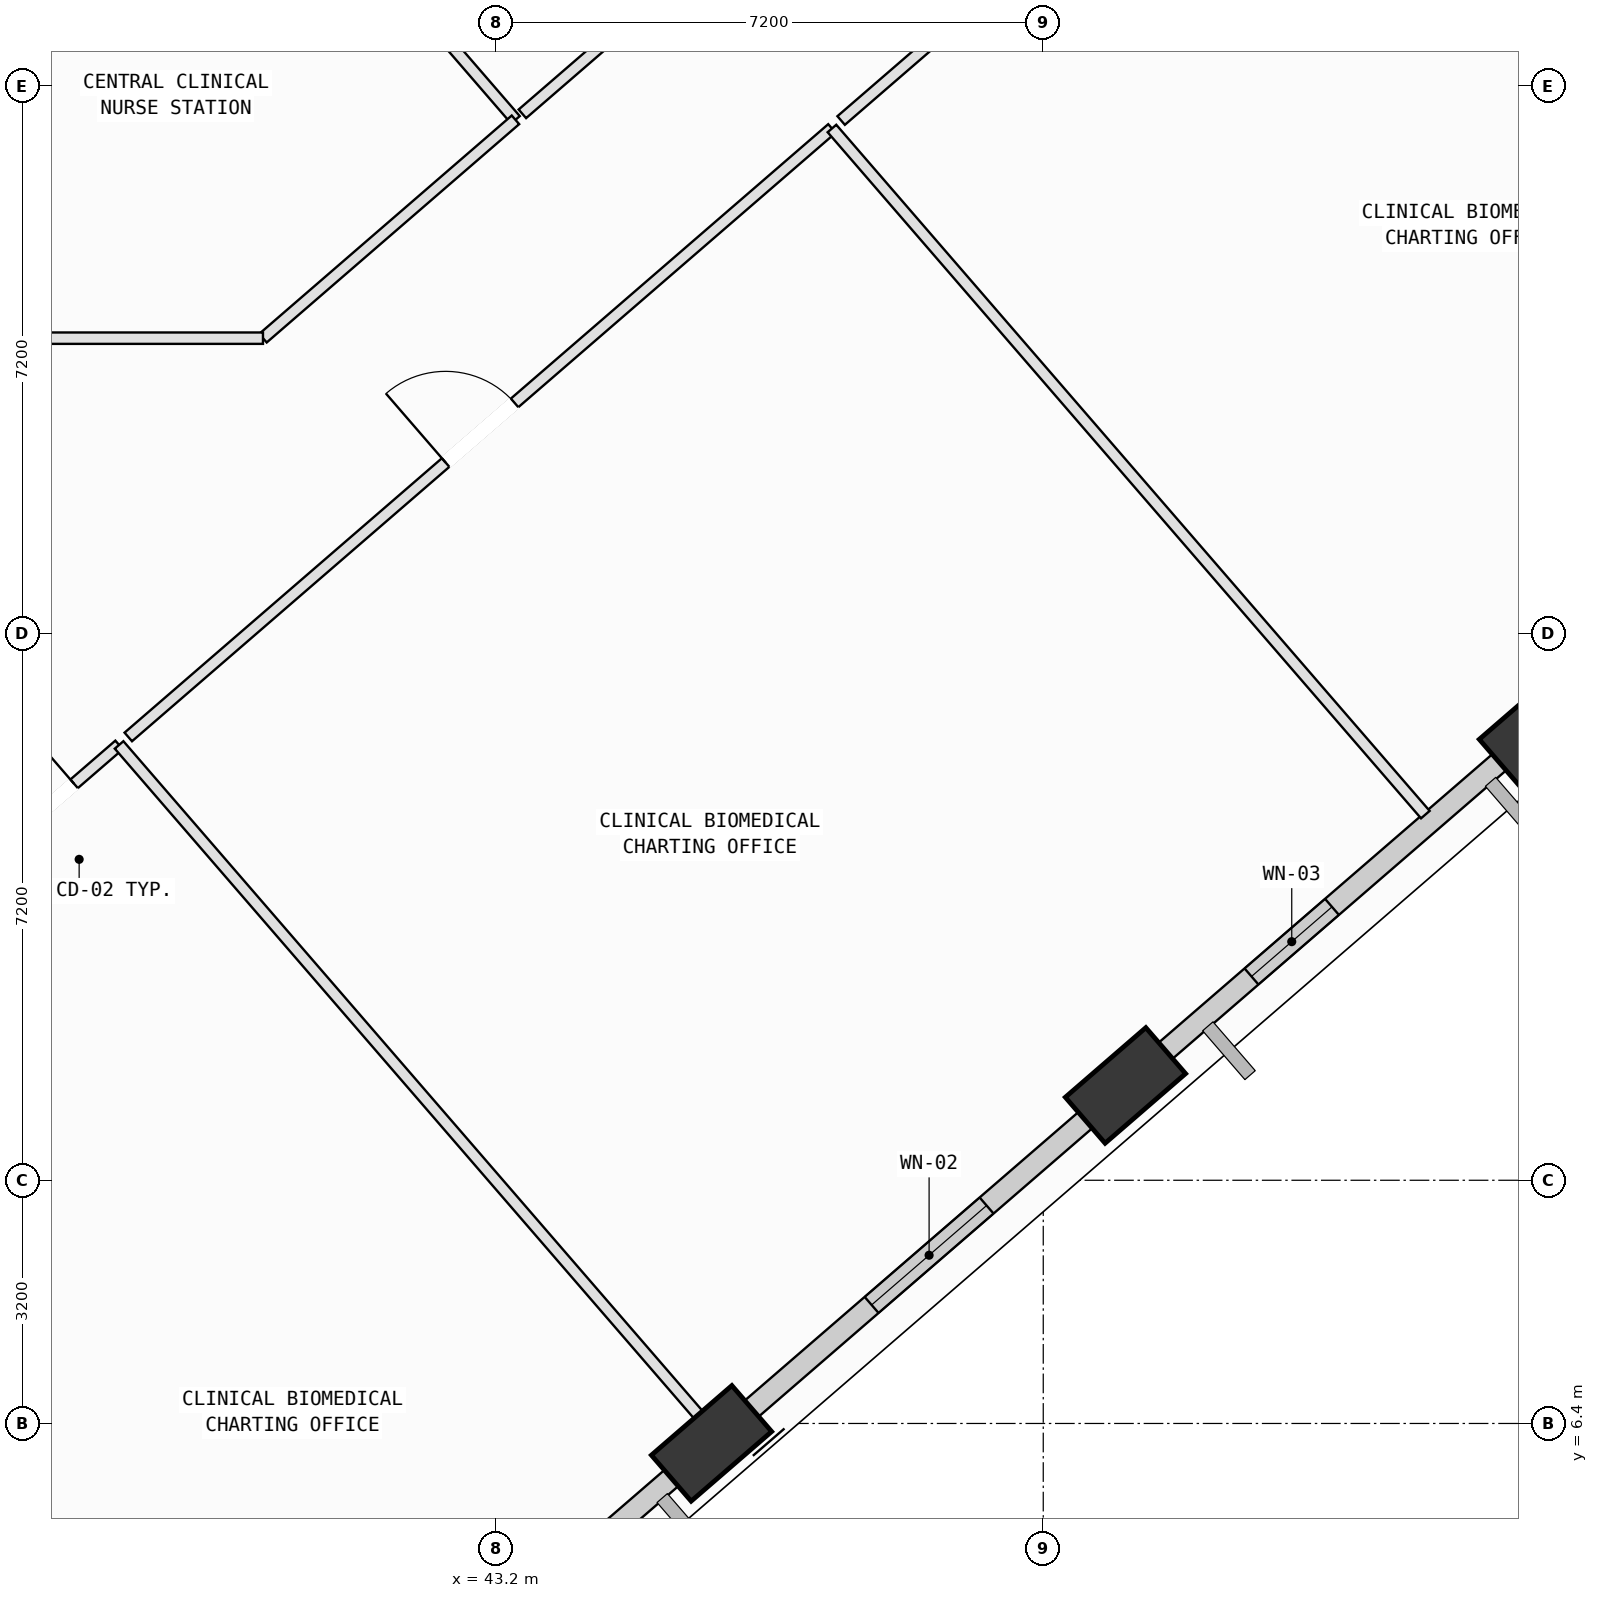
"""IFC4 building model, lengths in metres.
Left out: names, types, materials, properties, quantities, classifications, styles, units other than length and angle.
Written with IfcOpenShell. Run it as: python <this file> out.ifc"""

import sys

from ifc_helpers import new_model, si_unit, direction, frame, frame_2d, origin, origin_2d, place, context, subcontext, project, spatial, rectangle, extrude, element, fill, save


model = new_model("IFC4")
c1 = context("Model", 3, precision=1e-05, world=origin(), true_north=direction((0.0, 1.0)))
c2 = subcontext(c1, "Body", "Model", "MODEL_VIEW")
j1 = project(units=[si_unit("LENGTHUNIT", "METRE"), si_unit("PLANEANGLEUNIT", "RADIAN")], contexts=[c1])
p1 = place(None, origin())
s1 = spatial("IfcSite", under=j1, at=p1, CompositionType="ELEMENT")
p2 = place(p1, origin())
s2 = spatial("IfcBuilding", under=s1, at=p2, CompositionType="ELEMENT")
p3 = place(p2, frame((0.0, 0.0, 197.8)))
s3 = spatial("IfcBuildingStorey", under=s2, at=p3, CompositionType="ELEMENT", Elevation=197.8)
p4 = place(p3, frame((46.035, 6.138, 0.002), z_axis=(0.076583639666, 0.051947917613, 0.995708973542), x_axis=(-0.963601634945, 0.260400031482, 0.060528610881)))
e1 = element("IfcColumn", 1, at=p4, inside=s3, PredefinedType="COLUMN", context=c2, shape_type="SweptSolid", body=[
    extrude(rectangle(XDim=1.4, YDim=0.8, at=origin_2d()), origin(), (0.0, 0.0, 1.0), 4.014),
])
p5 = place(p3, frame((51.482, 10.848, 0.002), z_axis=(0.056990983007, 0.074264664089, 0.995608752233), x_axis=(-0.996545411149, -0.056108371123, 0.061229847357)))
e2 = element("IfcColumn", 2, at=p5, inside=s3, PredefinedType="COLUMN", context=c2, shape_type="SweptSolid", body=[
    extrude(rectangle(XDim=1.4, YDim=0.8, at=origin_2d()), origin(), (0.0, 0.0, 1.0), 4.014),
])
p6 = place(p3, frame((56.928, 15.557, 0.002), z_axis=(0.037308659292, 0.096492102534, 0.994634273535), x_axis=(-0.940140058416, -0.334002750608, 0.067667075804)))
e3 = element("IfcColumn", 3, at=p6, inside=s3, PredefinedType="COLUMN", context=c2, shape_type="SweptSolid", body=[
    extrude(rectangle(XDim=1.4, YDim=0.8, at=origin_2d()), origin(), (0.0, 0.0, 1.0), 4.018),
])
p7 = place(p3, frame((45.8, 5.935, 0.0), z_axis=(0.0, 0.0, 1.0), x_axis=(-0.756443022553, -0.654059594862, 0.0)))
e4 = element("IfcWall", 4, at=p7, inside=s3, PredefinedType="SOLIDWALL", context=c2, shape_type="SweptSolid", body=[
    extrude(rectangle(XDim=6.214, YDim=0.28, at=frame_2d((3.107, 0.0))), origin(), (0.0, 0.0, 1.0), 3.265),
])
p8 = place(p7, frame((2.306, 0.0, 0.75)))
e5 = element("IfcOpeningElement", 5, at=p8, cuts=e4, PredefinedType="OPENING", context=c2, shape_type="SweptSolid", body=[
    extrude(rectangle(XDim=1.6, YDim=1.95, at=frame_2d((0.8, 0.975))), frame((0.0, 0.15, 0.0), z_axis=(0.0, -1.0, 0.0), x_axis=(1.0, 0.0, 0.0)), (0.0, 0.0, 1.0), 0.3),
])
p9 = place(p3, frame((51.247, 10.644, 0.0), z_axis=(0.0, 0.0, 1.0), x_axis=(-0.756429422083, -0.654075323955, 0.0)))
e6 = element("IfcWall", 6, at=p9, inside=s3, PredefinedType="SOLIDWALL", context=c2, shape_type="SweptSolid", body=[
    extrude(rectangle(XDim=6.209, YDim=0.28, at=frame_2d((3.104, 0.0))), origin(), (0.0, 0.0, 1.0), 3.265),
])
p10 = place(p9, frame((2.105, 0.0, 0.75)))
e7 = element("IfcOpeningElement", 7, at=p10, cuts=e6, PredefinedType="OPENING", context=c2, shape_type="SweptSolid", body=[
    extrude(rectangle(XDim=2.0, YDim=1.95, at=frame_2d((1.0, 0.975))), frame((0.0, 0.15, 0.0), z_axis=(0.0, -1.0, 0.0), x_axis=(1.0, 0.0, 0.0)), (0.0, 0.0, 1.0), 0.3),
])
p11 = place(p3, frame((56.699, 15.359, 0.0), z_axis=(0.0, 0.0, 1.0), x_axis=(-0.756411472006, -0.654096082405, 0.0)))
e8 = element("IfcWall", 8, at=p11, inside=s3, PredefinedType="SOLIDWALL", context=c2, shape_type="SweptSolid", body=[
    extrude(rectangle(XDim=6.218, YDim=0.28, at=frame_2d((3.109, 0.0))), origin(), (0.0, 0.0, 1.0), 3.265),
])
p12 = place(p11, frame((3.305, 0.0, 0.75)))
e9 = element("IfcOpeningElement", 9, at=p12, cuts=e8, PredefinedType="OPENING", context=c2, shape_type="SweptSolid", body=[
    extrude(rectangle(XDim=1.4, YDim=1.85, at=frame_2d((0.7, 0.925))), frame((0.0, 0.15, 0.0), z_axis=(0.0, -1.0, 0.0), x_axis=(1.0, 0.0, 0.0)), (0.0, 0.0, 1.0), 0.3),
])
p13 = place(p3, frame((35.169, 24.372, 0.0), z_axis=(0.0, 0.0, 1.0), x_axis=(0.756430449214, 0.65407413609, 0.0)))
e10 = element("IfcWall", 10, at=p13, inside=s3, PredefinedType="SOLIDWALL", context=c2, shape_type="SweptSolid", body=[
    extrude(rectangle(XDim=6.211, YDim=0.28, at=frame_2d((3.105, 0.0))), origin(), (0.0, 0.0, 1.0), 3.265),
])
p14 = place(p13, frame((2.161, 0.0, 0.75)))
e11 = element("IfcOpeningElement", 11, at=p14, cuts=e10, PredefinedType="OPENING", context=c2, shape_type="SweptSolid", body=[
    extrude(rectangle(XDim=1.2, YDim=1.75, at=frame_2d((0.6, 0.875))), frame((0.0, 0.15, 0.0), z_axis=(0.0, -1.0, 0.0), x_axis=(1.0, 0.0, 0.0)), (0.0, 0.0, 1.0), 0.3),
])
p15 = place(p3, frame((36.15, 13.52, 0.0), z_axis=(0.0, 0.0, 1.0), x_axis=(0.756475362734, 0.654022190431, 0.0)))
e12 = element("IfcWall", 12, at=p15, inside=s3, PredefinedType="PARTITIONING", context=c2, shape_type="SweptSolid", body=[
    extrude(rectangle(XDim=2.764, YDim=0.15, at=frame_2d((1.382, 0.0))), origin(), (0.0, 0.0, 1.0), 3.78),
])
p16 = place(p15, frame((0.782, 0.0, 0.0)))
e13 = element("IfcOpeningElement", 13, at=p16, cuts=e12, PredefinedType="OPENING", context=c2, shape_type="SweptSolid", body=[
    extrude(rectangle(XDim=1.2, YDim=2.15, at=frame_2d((0.6, 1.075))), frame((0.0, 0.085, 0.0), z_axis=(0.0, -1.0, 0.0), x_axis=(1.0, 0.0, 0.0)), (0.0, 0.0, 1.0), 0.17),
])
p17 = place(p3, frame((38.241, 15.328, 0.0), z_axis=(0.0, 0.0, 1.0), x_axis=(0.654077846069, -0.756427241235, 0.0)))
e14 = element("IfcWall", 14, at=p17, inside=s3, PredefinedType="PARTITIONING", context=c2, shape_type="SweptSolid", body=[
    extrude(rectangle(XDim=12.28, YDim=0.15, at=frame_2d((6.14, 0.0))), origin(), (0.0, 0.0, 1.0), 3.78),
])
p18 = place(p3, frame((46.273, 6.039, 0.0), z_axis=(0.0, 0.0, 1.0), x_axis=(-0.755726890706, -0.654886911355, 0.0)))
e15 = element("IfcWall", 15, at=p18, inside=s3, PredefinedType="PARTITIONING", context=c2, shape_type="SweptSolid", body=[
    extrude(rectangle(XDim=0.426, YDim=0.15, at=frame_2d((0.213, 0.0))), origin(), (0.0, 0.0, 1.0), 3.265),
])
p19 = place(p3, frame((38.362, 15.433, 0.0), z_axis=(0.0, 0.0, 1.0), x_axis=(0.756407982528, 0.654100117694, 0.0)))
e16 = element("IfcWall", 16, at=p19, inside=s3, PredefinedType="PARTITIONING", context=c2, shape_type="SweptSolid", body=[
    extrude(rectangle(XDim=12.24, YDim=0.15, at=frame_2d((6.12, 0.0))), origin(), (0.0, 0.0, 1.0), 3.78),
])
p20 = place(p19, frame((5.52, 0.0, 0.0)))
e17 = element("IfcOpeningElement", 17, at=p20, cuts=e16, PredefinedType="OPENING", context=c2, shape_type="SweptSolid", body=[
    extrude(rectangle(XDim=1.2, YDim=2.15, at=frame_2d((0.6, 1.075))), frame((0.0, 0.085, 0.0), z_axis=(0.0, -1.0, 0.0), x_axis=(1.0, 0.0, 0.0)), (0.0, 0.0, 1.0), 0.17),
])
p21 = place(p3, frame((47.62, 23.439, 0.0), z_axis=(0.0, 0.0, 1.0), x_axis=(0.654095318202, -0.756412132839, 0.0)))
e18 = element("IfcWall", 18, at=p21, inside=s3, PredefinedType="PARTITIONING", context=c2, shape_type="SweptSolid", body=[
    extrude(rectangle(XDim=11.935, YDim=0.15, at=frame_2d((5.968, 0.0))), origin(), (0.0, 0.0, 1.0), 3.78),
])
p22 = place(p3, frame((52.145, 11.118, 0.0), z_axis=(0.0, 0.0, 1.0), x_axis=(-0.755868126294, -0.654723892685, 0.0)))
e19 = element("IfcWall", 19, at=p22, inside=s3, PredefinedType="PARTITIONING", context=c2, shape_type="SweptSolid", body=[
    extrude(rectangle(XDim=0.99, YDim=0.15, at=frame_2d((0.495, 0.0))), origin(), (0.0, 0.0, 1.0), 3.265),
])
p23 = place(p3, frame((47.741, 23.544, 0.0), z_axis=(0.0, 0.0, 1.0), x_axis=(0.756471721777, 0.654026401723, 0.0)))
e20 = element("IfcWall", 20, at=p23, inside=s3, PredefinedType="PARTITIONING", context=c2, shape_type="SweptSolid", body=[
    extrude(rectangle(XDim=12.24, YDim=0.15, at=frame_2d((6.12, 0.0))), origin(), (0.0, 0.0, 1.0), 3.065),
])
p24 = place(p23, frame((5.52, 0.0, 0.0)))
e21 = element("IfcOpeningElement", 21, at=p24, cuts=e20, PredefinedType="OPENING", context=c2, shape_type="SweptSolid", body=[
    extrude(rectangle(XDim=1.2, YDim=2.15, at=frame_2d((0.6, 1.075))), frame((0.0, 0.085, 0.0), z_axis=(0.0, -1.0, 0.0), x_axis=(1.0, 0.0, 0.0)), (0.0, 0.0, 1.0), 0.17),
])
p25 = place(p3, frame((29.943, 20.58, 0.0), z_axis=(0.0, 0.0, 1.0), x_axis=(0.756413617827, 0.654093600921, 0.0)))
e22 = element("IfcWall", 22, at=p25, inside=s3, PredefinedType="PARTITIONING", context=c2, shape_type="SweptSolid", body=[
    extrude(rectangle(XDim=12.167, YDim=0.15, at=frame_2d((6.083, 0.0))), origin(), (0.0, 0.0, 1.0), 3.78),
])
p26 = place(p3, frame((39.581, 28.035, 0.0), z_axis=(0.0, 0.0, 1.0), x_axis=(0.654029596341, -0.75646895978, 0.0)))
e23 = element("IfcWall", 23, at=p26, inside=s3, PredefinedType="PARTITIONING", context=c2, shape_type="SweptSolid", body=[
    extrude(rectangle(XDim=5.925, YDim=0.15, at=frame_2d((2.962, 0.0))), origin(), (0.0, 0.0, 1.0), 3.78),
])
p27 = place(p3, frame((43.456, 23.553, 0.0), z_axis=(0.0, 0.0, 1.0), x_axis=(-0.75636911902, -0.654145057149, 0.0)))
e24 = element("IfcWall", 24, at=p27, inside=s3, PredefinedType="PARTITIONING", context=c2, shape_type="SweptSolid", body=[
    extrude(rectangle(XDim=4.392, YDim=0.15, at=frame_2d((2.196, 0.0))), origin(), (0.0, 0.0, 1.0), 3.78),
])
p28 = place(p3, frame((40.134, 20.68, 0.0), z_axis=(0.0, 0.0, 1.0), x_axis=(-1.0, 0.0, 0.0)))
e25 = element("IfcWall", 25, at=p28, inside=s3, PredefinedType="PARTITIONING", context=c2, shape_type="SweptSolid", body=[
    extrude(rectangle(XDim=8.937, YDim=0.15, at=frame_2d((4.469, 0.0))), origin(), (0.0, 0.0, 1.0), 3.78),
])
p29 = place(p28, frame((3.868, 0.0, 0.0)))
e26 = element("IfcOpeningElement", 26, at=p29, cuts=e25, PredefinedType="OPENING", context=c2, shape_type="SweptSolid", body=[
    extrude(rectangle(XDim=1.2, YDim=2.15, at=frame_2d((0.6, 1.075))), frame((0.0, 0.085, 0.0), z_axis=(0.0, -1.0, 0.0), x_axis=(1.0, 0.0, 0.0)), (0.0, 0.0, 1.0), 0.17),
])
p30 = place(p3, frame((55.05, 33.579, 0.0), z_axis=(0.0, 0.0, 1.0), x_axis=(-0.756410615278, -0.654097073144, 0.0)))
e27 = element("IfcWall", 27, at=p30, inside=s3, PredefinedType="PARTITIONING", context=c2, shape_type="SweptSolid", body=[
    extrude(rectangle(XDim=15.207, YDim=0.15, at=frame_2d((7.604, 0.0))), origin(), (0.0, 0.0, 1.0), 3.78),
])
p31 = place(p30, frame((7.004, 0.0, 0.0)))
e28 = element("IfcOpeningElement", 28, at=p31, cuts=e27, PredefinedType="OPENING", context=c2, shape_type="SweptSolid", body=[
    extrude(rectangle(XDim=1.2, YDim=2.15, at=frame_2d((0.6, 1.075))), frame((0.0, 0.085, 0.0), z_axis=(0.0, -1.0, 0.0), x_axis=(1.0, 0.0, 0.0)), (0.0, 0.0, 1.0), 0.17),
])
p32 = place(p10, origin())
e29 = element("IfcWindow", 29, at=p32, inside=s3, PartitioningType="SINGLE_PANEL", PredefinedType="WINDOW", context=c2, shape_type="SweptSolid", body=[
    extrude(rectangle(XDim=2.0, YDim=1.95, at=frame_2d((1.0, 0.975))), frame((0.0, 0.03, 0.0), z_axis=(0.0, -1.0, 0.0), x_axis=(1.0, 0.0, 0.0)), (0.0, 0.0, 1.0), 0.06),
])
fill(e7, e29)
p33 = place(p12, origin())
e30 = element("IfcWindow", 30, at=p33, inside=s3, PartitioningType="SINGLE_PANEL", PredefinedType="WINDOW", context=c2, shape_type="SweptSolid", body=[
    extrude(rectangle(XDim=1.4, YDim=1.85, at=frame_2d((0.7, 0.925))), frame((0.0, 0.03, 0.0), z_axis=(0.0, -1.0, 0.0), x_axis=(1.0, 0.0, 0.0)), (0.0, 0.0, 1.0), 0.06),
])
fill(e9, e30)
p34 = place(p16, origin())
e31 = element("IfcDoor", 31, at=p34, inside=s3, OperationType="SINGLE_SWING_RIGHT", PredefinedType="DOOR", context=c2, shape_type="SweptSolid", body=[
    extrude(rectangle(XDim=1.2, YDim=2.15, at=frame_2d((0.6, 1.075))), frame((0.0, 0.025, 0.0), z_axis=(0.0, -1.0, 0.0), x_axis=(1.0, 0.0, 0.0)), (0.0, 0.0, 1.0), 0.05),
])
fill(e13, e31)
p35 = place(p20, origin())
e32 = element("IfcDoor", 32, at=p35, inside=s3, OperationType="SINGLE_SWING_LEFT", PredefinedType="DOOR", context=c2, shape_type="SweptSolid", body=[
    extrude(rectangle(XDim=1.2, YDim=2.15, at=frame_2d((0.6, 1.075))), frame((0.0, 0.025, 0.0), z_axis=(0.0, -1.0, 0.0), x_axis=(1.0, 0.0, 0.0)), (0.0, 0.0, 1.0), 0.05),
])
fill(e17, e32)
save(model, sys.argv[1])
